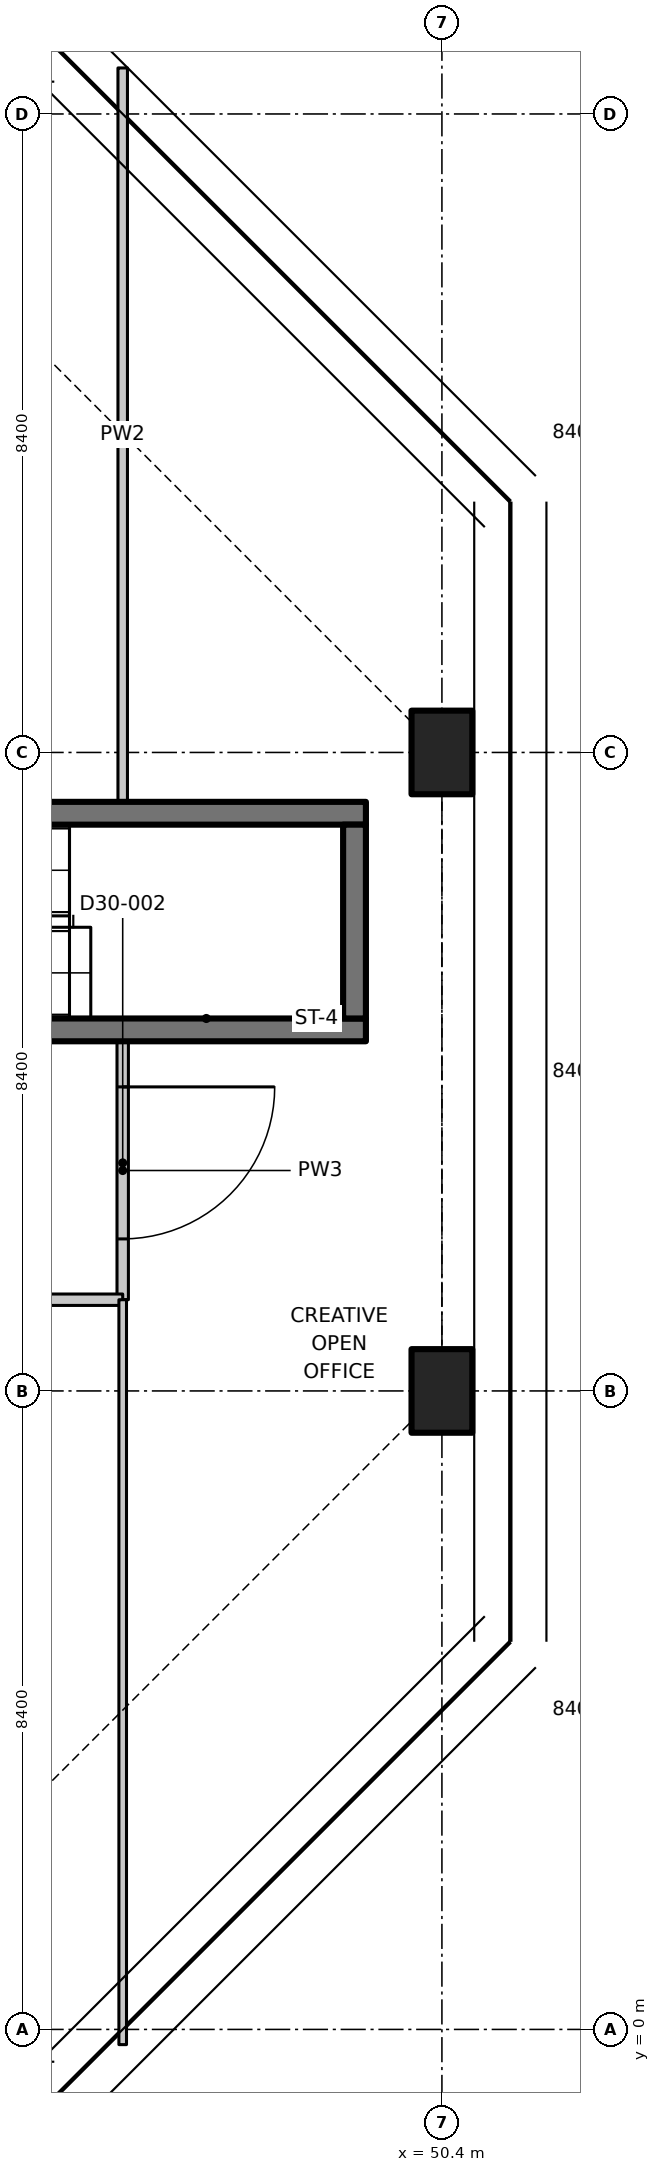
"""IFC4 building model, lengths in metres.
Left out: names, types, materials, properties, quantities, classifications, styles, units other than length and angle.
Written with IfcOpenShell. Run it as: python <this file> out.ifc"""

import sys

from ifc_helpers import new_model, si_unit, direction, frame, frame_2d, origin, origin_2d, place, context, subcontext, project, spatial, polyline, rectangle, outline, extrude, element, fill, save


model = new_model("IFC4")
c1 = context("Model", 3, precision=1e-05, world=origin(), true_north=direction((0.0, 1.0)))
c2 = subcontext(c1, "Body", "Model", "MODEL_VIEW")
j1 = project(units=[si_unit("LENGTHUNIT", "METRE"), si_unit("PLANEANGLEUNIT", "RADIAN")], contexts=[c1])
p1 = place(None, origin())
s1 = spatial("IfcSite", under=j1, at=p1, CompositionType="ELEMENT")
p2 = place(p1, origin())
s2 = spatial("IfcBuilding", under=s1, at=p2, CompositionType="ELEMENT")
p3 = place(p2, frame((0.0, 0.0, 240.9)))
s3 = spatial("IfcBuildingStorey", under=s2, at=p3, CompositionType="ELEMENT", Elevation=240.9)
for number, where, z_axis, x_axis in (
    (1, (50.4, 8.4, 0.0), (0.0, 0.0, 1.0), (1.0, 0.0, 0.0)),
    (2, (50.4, 16.8, 0.0), (0.0, 0.0, 1.0), (1.0, 0.0, 0.0)),
):
    element("IfcColumn", number, at=place(p3, frame(where, z_axis=z_axis, x_axis=x_axis)), inside=s3, PredefinedType="COLUMN", context=c2, shape_type="SweptSolid", body=[
        extrude(rectangle(XDim=0.8, YDim=1.1, at=origin_2d()), origin(), (0.0, 0.0, 1.0), 3.35),
    ])
p4 = place(p3, frame((49.4, 13.15, 0.0), z_axis=(0.0, 0.0, 1.0), x_axis=(-1.0, 0.0, 0.0)))
e3 = element("IfcWall", 3, at=p4, inside=s3, PredefinedType="SHEAR", context=c2, shape_type="SweptSolid", body=[
    extrude(rectangle(XDim=8.2, YDim=0.3, at=frame_2d((4.1, 0.0))), origin(), (0.0, 0.0, 1.0), 3.35),
])
p5 = place(p4, frame((6.8, 0.0, 0.0)))
e4 = element("IfcOpeningElement", 4, at=p5, cuts=e3, PredefinedType="OPENING", context=c2, shape_type="SweptSolid", body=[
    extrude(rectangle(XDim=1.0, YDim=2.1, at=frame_2d((0.5, 1.05))), frame((0.0, 0.16, 0.0), z_axis=(0.0, -1.0, 0.0), x_axis=(1.0, 0.0, 0.0)), (0.0, 0.0, 1.0), 0.32),
])
p6 = place(p3, frame((41.2, 16.0, 0.0), z_axis=(0.0, 0.0, 1.0), x_axis=(1.0, 0.0, 0.0)))
e5 = element("IfcWall", 5, at=p6, inside=s3, PredefinedType="SHEAR", context=c2, shape_type="SweptSolid", body=[
    extrude(rectangle(XDim=8.2, YDim=0.3, at=frame_2d((4.1, 0.0))), origin(), (0.0, 0.0, 1.0), 3.35),
])
p7 = place(p3, frame((49.25, 13.3, 0.0), z_axis=(0.0, 0.0, 1.0), x_axis=(0.0, 1.0, 0.0)))
e6 = element("IfcWall", 6, at=p7, inside=s3, PredefinedType="SHEAR", context=c2, shape_type="SweptSolid", body=[
    extrude(rectangle(XDim=2.55, YDim=0.3, at=frame_2d((1.275, 0.0))), origin(), (0.0, 0.0, 1.0), 3.35),
])
p8 = place(p3, frame((46.2, 13.0, 0.0), z_axis=(0.0, 0.0, 1.0), x_axis=(0.0, -1.0, 0.0)))
e7 = element("IfcWall", 7, at=p8, inside=s3, PredefinedType="PARTITIONING", context=c2, shape_type="SweptSolid", body=[
    extrude(rectangle(XDim=3.4, YDim=0.15, at=frame_2d((1.7, 0.0))), origin(), (0.0, 0.0, 1.0), 3.33),
])
p9 = place(p8, frame((0.6, 0.0, 0.0)))
e8 = element("IfcOpeningElement", 8, at=p9, cuts=e7, PredefinedType="OPENING", context=c2, shape_type="SweptSolid", body=[
    extrude(rectangle(XDim=2.0, YDim=2.4, at=frame_2d((1.0, 1.2))), frame((0.0, 0.085, 0.0), z_axis=(0.0, -1.0, 0.0), x_axis=(1.0, 0.0, 0.0)), (0.0, 0.0, 1.0), 0.17),
])
p10 = place(p3, frame((46.2, 9.6, 0.0), z_axis=(0.0, 0.0, 1.0), x_axis=(-1.0, 0.0, 0.0)))
e9 = element("IfcWall", 9, at=p10, inside=s3, PredefinedType="PARTITIONING", context=c2, shape_type="SweptSolid", body=[
    extrude(rectangle(XDim=16.8, YDim=0.15, at=frame_2d((8.4, 0.0))), origin(), (0.0, 0.0, 1.0), 3.33),
])
p11 = place(p10, frame((7.5, 0.0, 0.0)))
e10 = element("IfcOpeningElement", 10, at=p11, cuts=e9, PredefinedType="OPENING", context=c2, shape_type="SweptSolid", body=[
    extrude(rectangle(XDim=2.0, YDim=2.4, at=frame_2d((1.0, 1.2))), frame((0.0, 0.085, 0.0), z_axis=(0.0, -1.0, 0.0), x_axis=(1.0, 0.0, 0.0)), (0.0, 0.0, 1.0), 0.17),
])
p12 = place(p3, frame((46.2, -0.2, 0.0), z_axis=(0.0, 0.0, 1.0), x_axis=(0.0, 1.0, 0.0)))
e11 = element("IfcWall", 11, at=p12, inside=s3, PredefinedType="PARTITIONING", context=c2, shape_type="SweptSolid", body=[
    extrude(outline(polyline([(0.0, 0.0), (9.8, 0.0), (9.8, 3.33), (5.066, 3.33), (5.064, 2.98), (3.736, 2.98), (3.734, 3.33), (0.0, 3.33), (0.0, 0.0)])), frame((0.0, 0.05, 0.0), z_axis=(0.0, -1.0, 0.0), x_axis=(1.0, 0.0, 0.0)), (0.0, 0.0, 1.0), 0.1),
])
p13 = place(p3, frame((46.2, 16.15, 0.0), z_axis=(0.0, 0.0, 1.0), x_axis=(0.0, 1.0, 0.0)))
e12 = element("IfcWall", 12, at=p13, inside=s3, PredefinedType="PARTITIONING", context=c2, shape_type="SweptSolid", body=[
    extrude(outline(polyline([(0.0, 0.0), (9.656, 0.0), (9.656, 3.33), (9.25, 3.33), (5.528, 3.33), (5.526, 2.98), (4.174, 2.98), (4.172, 3.33), (0.0, 3.33), (0.0, 0.0)])), frame((0.0, 0.062, 0.0), z_axis=(0.0, -1.0, 0.0), x_axis=(1.0, 0.0, 0.0)), (0.0, 0.0, 1.0), 0.125),
])
p14 = place(p9, origin())
e13 = element("IfcDoor", 13, at=p14, inside=s3, OperationType="DOUBLE_DOOR_SINGLE_SWING", PredefinedType="DOOR", context=c2, shape_type="SweptSolid", body=[
    extrude(rectangle(XDim=2.0, YDim=2.4, at=frame_2d((1.0, 1.2))), frame((0.0, 0.025, 0.0), z_axis=(0.0, -1.0, 0.0), x_axis=(1.0, 0.0, 0.0)), (0.0, 0.0, 1.0), 0.05),
])
fill(e8, e13)
save(model, sys.argv[1])
